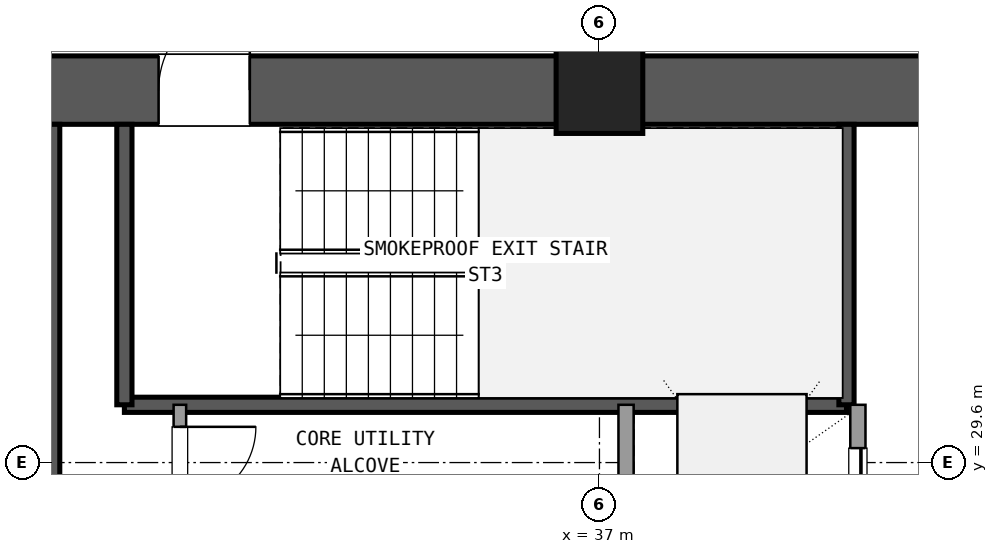
"""IFC4 building model, lengths in metres.
Left out: names, types, materials, properties, quantities, classifications, styles, units other than length and angle.
Written with IfcOpenShell. Run it as: python <this file> out.ifc"""

import sys

from ifc_helpers import new_model, si_unit, direction, frame, frame_2d, origin, origin_2d, place, context, subcontext, project, spatial, rectangle, extrude, element, fill, save


model = new_model("IFC4")
c1 = context("Model", 3, precision=1e-05, world=origin(), true_north=direction((0.0, 1.0)))
c2 = subcontext(c1, "Body", "Model", "MODEL_VIEW")
j1 = project(units=[si_unit("LENGTHUNIT", "METRE"), si_unit("PLANEANGLEUNIT", "RADIAN")], contexts=[c1])
p1 = place(None, origin())
s1 = spatial("IfcSite", under=j1, at=p1, CompositionType="ELEMENT")
p2 = place(p1, origin())
s2 = spatial("IfcBuilding", under=s1, at=p2, CompositionType="ELEMENT")
p3 = place(p2, frame((0.0, 0.0, 27.54)))
s3 = spatial("IfcBuildingStorey", under=s2, at=p3, CompositionType="ELEMENT", Elevation=27.54)
p4 = place(p3, frame((37.0, 34.5, 0.0), z_axis=(0.0, 0.0, 1.0), x_axis=(1.0, 0.0, 0.0)))
e1 = element("IfcColumn", 1, at=p4, inside=s3, PredefinedType="COLUMN", context=c2, shape_type="SweptSolid", body=[
    extrude(rectangle(XDim=1.14, YDim=1.14, at=origin_2d()), origin(), (0.0, 0.0, 1.0), 3.6),
])
p5 = place(p3, frame((47.635, 34.5, 0.0), z_axis=(0.0, 0.0, 1.0), x_axis=(-1.0, 0.0, 0.0)))
e2 = element("IfcWall", 2, at=p5, inside=s3, PredefinedType="SHEAR", context=c2, shape_type="SweptSolid", body=[
    extrude(rectangle(XDim=10.07, YDim=0.9, at=frame_2d((5.035, 0.0))), origin(), (0.0, 0.0, 1.0), 3.32),
])
p6 = place(p5, frame((4.535, 0.0, 0.0)))
e3 = element("IfcOpeningElement", 3, at=p6, cuts=e2, PredefinedType="OPENING", context=c2, shape_type="SweptSolid", body=[
    extrude(rectangle(XDim=1.6, YDim=2.2, at=frame_2d((0.8, 1.1))), frame((0.0, 0.46, 0.0), z_axis=(0.0, -1.0, 0.0), x_axis=(1.0, 0.0, 0.0)), (0.0, 0.0, 1.0), 0.92),
])
p7 = place(p3, frame((36.435, 34.5, 0.0), z_axis=(0.0, 0.0, 1.0), x_axis=(-1.0, 0.0, 0.0)))
e4 = element("IfcWall", 4, at=p7, inside=s3, PredefinedType="SHEAR", context=c2, shape_type="SweptSolid", body=[
    extrude(rectangle(XDim=10.07, YDim=0.9, at=frame_2d((5.035, 0.0))), origin(), (0.0, 0.0, 1.0), 3.32),
])
p8 = place(p7, frame((4.035, 0.0, 0.0)))
e5 = element("IfcOpeningElement", 5, at=p8, cuts=e4, PredefinedType="OPENING", context=c2, shape_type="SweptSolid", body=[
    extrude(rectangle(XDim=1.2, YDim=2.15, at=frame_2d((0.6, 1.075))), frame((0.0, 0.46, 0.0), z_axis=(0.0, -1.0, 0.0), x_axis=(1.0, 0.0, 0.0)), (0.0, 0.0, 1.0), 0.92),
])
p9 = place(p3, frame((29.8, 24.65, 0.0), z_axis=(0.0, 0.0, 1.0), x_axis=(0.0, 1.0, 0.0)))
e6 = element("IfcWall", 6, at=p9, inside=s3, PredefinedType="SHEAR", context=c2, shape_type="SweptSolid", body=[
    extrude(rectangle(XDim=9.4, YDim=0.2, at=frame_2d((4.7, 0.0))), origin(), (0.0, 0.0, 1.0), 3.32),
])
p10 = place(p3, frame((30.75, 30.36, 0.0), z_axis=(0.0, 0.0, 1.0), x_axis=(1.0, 0.0, 0.0)))
e7 = element("IfcWall", 7, at=p10, inside=s3, PredefinedType="SHEAR", context=c2, shape_type="SweptSolid", body=[
    extrude(rectangle(XDim=9.5, YDim=0.2, at=frame_2d((4.75, 0.0))), origin(), (0.0, 0.0, 1.0), 3.32),
])
for number, where, z_axis, x_axis in (
    (8, (30.75, 30.36, 0.0), (0.0, 0.0, 1.0), (0.0, 1.0, 0.0)),
    (9, (40.25, 30.36, 0.0), (0.0, 0.0, 1.0), (0.0, 1.0, 0.0)),
):
    element("IfcWall", number, at=place(p3, frame(where, z_axis=z_axis, x_axis=x_axis)), inside=s3, PredefinedType="SHEAR", context=c2, shape_type="SweptSolid", body=[
        extrude(rectangle(XDim=3.69, YDim=0.2, at=frame_2d((1.845, 0.0))), origin(), (0.0, 0.0, 1.0), 3.32),
    ])
p11 = place(p3, frame((37.35, 23.54, 0.0), z_axis=(0.0, 0.0, 1.0), x_axis=(0.0, 1.0, 0.0)))
e10 = element("IfcWall", 10, at=p11, inside=s3, PredefinedType="SOLIDWALL", context=c2, shape_type="SweptSolid", body=[
    extrude(rectangle(XDim=6.82, YDim=0.2, at=frame_2d((3.41, 0.0))), origin(), (0.0, 0.0, 1.0), 2.61),
])
p12 = place(p3, frame((40.4, 23.54, 0.0), z_axis=(0.0, 0.0, 1.0), x_axis=(0.0, 1.0, 0.0)))
e11 = element("IfcWall", 11, at=p12, inside=s3, PredefinedType="SOLIDWALL", context=c2, shape_type="SweptSolid", body=[
    extrude(rectangle(XDim=6.82, YDim=0.2, at=frame_2d((3.41, 0.0))), origin(), (0.0, 0.0, 1.0), 2.61),
])
p13 = place(p12, frame((0.35, 0.0, 0.0)))
e12 = element("IfcOpeningElement", 12, at=p13, cuts=e11, PredefinedType="OPENING", context=c2, shape_type="SweptSolid", body=[
    extrude(rectangle(XDim=1.4, YDim=2.2, at=frame_2d((0.7, 1.1))), frame((0.0, 0.11, 0.0), z_axis=(0.0, -1.0, 0.0), x_axis=(1.0, 0.0, 0.0)), (0.0, 0.0, 1.0), 0.22),
])
p14 = place(p12, frame((2.65, 0.0, 0.0)))
e13 = element("IfcOpeningElement", 13, at=p14, cuts=e11, PredefinedType="OPENING", context=c2, shape_type="SweptSolid", body=[
    extrude(rectangle(XDim=1.4, YDim=2.2, at=frame_2d((0.7, 1.1))), frame((0.0, 0.11, 0.0), z_axis=(0.0, -1.0, 0.0), x_axis=(1.0, 0.0, 0.0)), (0.0, 0.0, 1.0), 0.22),
])
p15 = place(p12, frame((4.85, 0.0, 0.0)))
e14 = element("IfcOpeningElement", 14, at=p15, cuts=e11, PredefinedType="OPENING", context=c2, shape_type="SweptSolid", body=[
    extrude(rectangle(XDim=1.4, YDim=2.2, at=frame_2d((0.7, 1.1))), frame((0.0, 0.11, 0.0), z_axis=(0.0, -1.0, 0.0), x_axis=(1.0, 0.0, 0.0)), (0.0, 0.0, 1.0), 0.22),
])
p16 = place(p3, frame((31.48, 26.32, 0.0), z_axis=(0.0, 0.0, 1.0), x_axis=(0.0, 1.0, 0.0)))
e15 = element("IfcWall", 15, at=p16, inside=s3, PredefinedType="PLUMBINGWALL", context=c2, shape_type="SweptSolid", body=[
    extrude(rectangle(XDim=4.04, YDim=0.165, at=frame_2d((2.02, 0.0))), origin(), (0.0, 0.0, 1.0), 2.61),
])
p17 = place(p16, frame((2.75, 0.0, 0.0)))
e16 = element("IfcOpeningElement", 16, at=p17, cuts=e15, PredefinedType="OPENING", context=c2, shape_type="SweptSolid", body=[
    extrude(rectangle(XDim=1.0, YDim=2.15, at=frame_2d((0.5, 1.075))), frame((0.0, 0.093, 0.0), z_axis=(0.0, -1.0, 0.0), x_axis=(1.0, 0.0, 0.0)), (0.0, 0.0, 1.0), 0.185),
])
p18 = place(p3, frame((37.0, 34.95, 0.0), z_axis=(0.0, 0.0, 1.0), x_axis=(0.0, 1.0, 0.0)))
e17 = element("IfcWall", 17, at=p18, inside=s3, PredefinedType="PARTITIONING", context=c2, shape_type="SweptSolid", body=[
    extrude(rectangle(XDim=2.7, YDim=0.18, at=frame_2d((1.35, 0.0))), origin(), (0.0, 0.0, 1.0), 2.61),
])
p19 = place(p18, frame((0.35, 0.0, 0.0)))
e18 = element("IfcOpeningElement", 18, at=p19, cuts=e17, PredefinedType="OPENING", context=c2, shape_type="SweptSolid", body=[
    extrude(rectangle(XDim=2.0, YDim=2.2, at=frame_2d((1.0, 1.1))), frame((0.0, 0.1, 0.0), z_axis=(0.0, -1.0, 0.0), x_axis=(1.0, 0.0, 0.0)), (0.0, 0.0, 1.0), 0.2),
])
p20 = place(p8, frame((1.2, 0.0, 0.0), z_axis=(0.0, 0.0, 1.0), x_axis=(-1.0, 0.0, 0.0)))
e19 = element("IfcDoor", 19, at=p20, inside=s3, OperationType="SINGLE_SWING_LEFT", PredefinedType="DOOR", context=c2, shape_type="SweptSolid", body=[
    extrude(rectangle(XDim=1.2, YDim=2.15, at=frame_2d((0.6, 1.075))), frame((0.0, 0.025, 0.0), z_axis=(0.0, -1.0, 0.0), x_axis=(1.0, 0.0, 0.0)), (0.0, 0.0, 1.0), 0.05),
])
fill(e5, e19)
p21 = place(p15, origin())
e20 = element("IfcDoor", 20, at=p21, inside=s3, OperationType="SLIDING_TO_RIGHT", PredefinedType="DOOR", context=c2, shape_type="SweptSolid", body=[
    extrude(rectangle(XDim=1.4, YDim=2.2, at=frame_2d((0.7, 1.1))), frame((0.0, 0.025, 0.0), z_axis=(0.0, -1.0, 0.0), x_axis=(1.0, 0.0, 0.0)), (0.0, 0.0, 1.0), 0.05),
])
fill(e14, e20)
p22 = place(p17, frame((1.0, 0.0, 0.0), z_axis=(0.0, 0.0, 1.0), x_axis=(-1.0, 0.0, 0.0)))
e21 = element("IfcDoor", 21, at=p22, inside=s3, OperationType="SINGLE_SWING_RIGHT", PredefinedType="DOOR", context=c2, shape_type="SweptSolid", body=[
    extrude(rectangle(XDim=1.0, YDim=2.15, at=frame_2d((0.5, 1.075))), frame((0.0, 0.025, 0.0), z_axis=(0.0, -1.0, 0.0), x_axis=(1.0, 0.0, 0.0)), (0.0, 0.0, 1.0), 0.05),
])
fill(e16, e21)
save(model, sys.argv[1])
